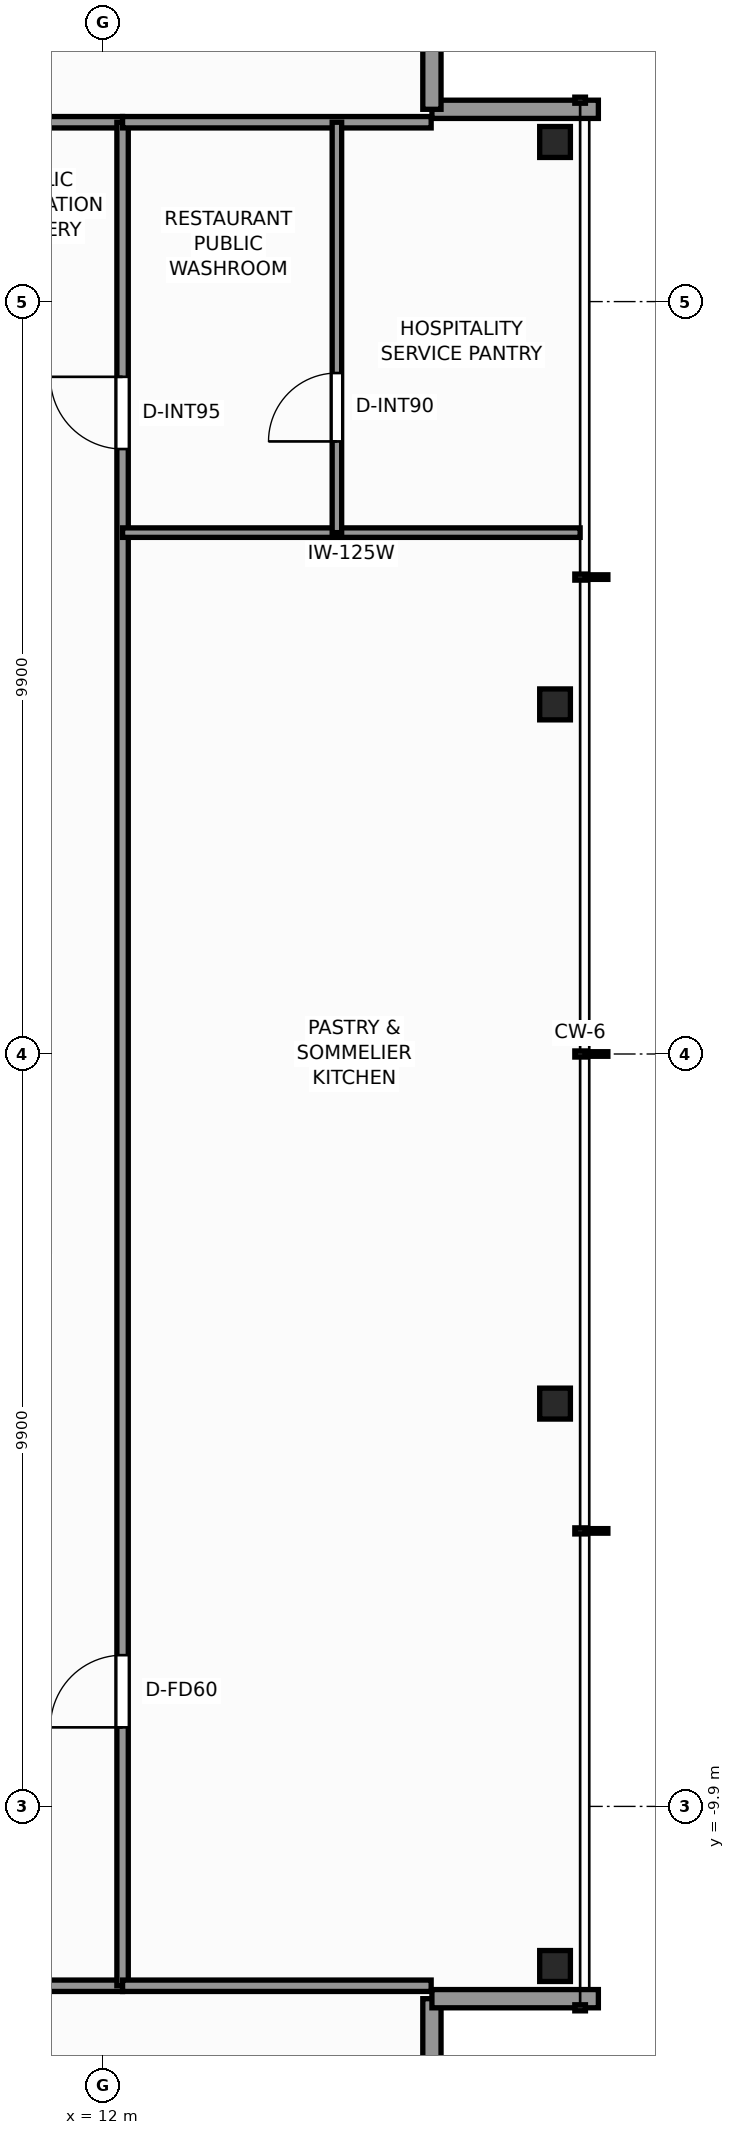
"""IFC4 building model, lengths in metres.
Left out: names, types, materials, properties, quantities, classifications, styles, units other than length and angle.
Written with IfcOpenShell. Run it as: python <this file> out.ifc"""

import sys

from ifc_helpers import new_model, si_unit, direction, frame, frame_2d, origin, origin_2d, place, context, subcontext, project, spatial, rectangle, i_section, extrude, element, fill, save


model = new_model("IFC4")
c1 = context("Model", 3, precision=1e-05, world=origin(), true_north=direction((0.0, 1.0)))
c2 = subcontext(c1, "Body", "Model", "MODEL_VIEW")
j1 = project(units=[si_unit("LENGTHUNIT", "METRE"), si_unit("PLANEANGLEUNIT", "RADIAN")], contexts=[c1])
p1 = place(None, origin())
s1 = spatial("IfcSite", under=j1, at=p1, CompositionType="ELEMENT")
p2 = place(p1, origin())
s2 = spatial("IfcBuilding", under=s1, at=p2, CompositionType="ELEMENT")
p3 = place(p2, frame((0.0, 0.0, 262.8)))
s3 = spatial("IfcBuildingStorey", under=s2, at=p3, CompositionType="ELEMENT", Elevation=262.8)
for number, where, z_axis, x_axis in (
    (1, (17.95, -12.0, 0.0), (0.0, 0.0, 1.0), (1.0, 0.0, 0.0)),
    (2, (17.95, -4.6, 0.0), (0.0, 0.0, 1.0), (1.0, 0.0, 0.0)),
    (3, (17.95, 4.6, 0.0), (0.0, 0.0, 1.0), (1.0, 0.0, 0.0)),
    (4, (17.95, 12.0, 0.0), (0.0, 0.0, 1.0), (1.0, 0.0, 0.0)),
):
    element("IfcColumn", number, at=place(p3, frame(where, z_axis=z_axis, x_axis=x_axis)), inside=s3, PredefinedType="COLUMN", context=c2, shape_type="SweptSolid", body=[
        extrude(i_section(OverallWidth=0.404, OverallDepth=0.407, WebThickness=0.027, FlangeThickness=0.044, FilletRadius=0.025, at=origin_2d()), origin(), (0.0, 0.0, 1.0), 4.6),
    ])
p4 = place(p3, frame((16.33, -12.43, 0.0), z_axis=(0.0, 0.0, 1.0), x_axis=(0.0, -1.0, 0.0)))
e5 = element("IfcWall", 5, at=p4, inside=s3, PredefinedType="STANDARD", context=c2, shape_type="SweptSolid", body=[
    extrude(rectangle(XDim=2.19, YDim=0.24, at=frame_2d((1.095, 0.0))), origin(), (0.0, 0.0, 1.0), 3.703),
])
for number, where, z_axis, x_axis in (
    (6, (18.52, -12.43, 0.0), (0.0, 0.0, 1.0), (-1.0, 0.0, 0.0)),
    (7, (16.33, 12.43, 0.0), (0.0, 0.0, 1.0), (1.0, 0.0, 0.0)),
):
    element("IfcWall", number, at=place(p3, frame(where, z_axis=z_axis, x_axis=x_axis)), inside=s3, PredefinedType="STANDARD", context=c2, shape_type="SweptSolid", body=[
        extrude(rectangle(XDim=2.19, YDim=0.24, at=frame_2d((1.095, 0.0))), origin(), (0.0, 0.0, 1.0), 3.703),
    ])
p5 = place(p3, frame((16.33, 14.62, 0.0), z_axis=(0.0, 0.0, 1.0), x_axis=(0.0, -1.0, 0.0)))
e8 = element("IfcWall", 8, at=p5, inside=s3, PredefinedType="STANDARD", context=c2, shape_type="SweptSolid", body=[
    extrude(rectangle(XDim=2.19, YDim=0.24, at=frame_2d((1.095, 0.0))), origin(), (0.0, 0.0, 1.0), 3.703),
])
p6 = place(p3, frame((-12.26, -12.26, 0.0), z_axis=(0.0, 0.0, 1.0), x_axis=(1.0, 0.0, 0.0)))
e9 = element("IfcWall", 9, at=p6, inside=s3, PredefinedType="PARTITIONING", context=c2, shape_type="SweptSolid", body=[
    extrude(rectangle(XDim=24.52, YDim=0.15, at=frame_2d((12.26, 0.0))), origin(), (0.0, 0.0, 1.0), 3.609),
])
p7 = place(p6, frame((3.6, 0.0, 0.0)))
e10 = element("IfcOpeningElement", 10, at=p7, cuts=e9, PredefinedType="OPENING", context=c2, shape_type="SweptSolid", body=[
    extrude(rectangle(XDim=1.6, YDim=2.3, at=frame_2d((0.8, 1.15))), frame((0.0, 0.085, 0.0), z_axis=(0.0, -1.0, 0.0), x_axis=(1.0, 0.0, 0.0)), (0.0, 0.0, 1.0), 0.17),
])
p8 = place(p6, frame((19.06, 0.0, 0.0)))
e11 = element("IfcOpeningElement", 11, at=p8, cuts=e9, PredefinedType="OPENING", context=c2, shape_type="SweptSolid", body=[
    extrude(rectangle(XDim=1.2, YDim=2.2, at=frame_2d((0.6, 1.1))), frame((0.0, 0.085, 0.0), z_axis=(0.0, -1.0, 0.0), x_axis=(1.0, 0.0, 0.0)), (0.0, 0.0, 1.0), 0.17),
])
p9 = place(p3, frame((-12.26, 12.26, 0.0), z_axis=(0.0, 0.0, 1.0), x_axis=(1.0, 0.0, 0.0)))
e12 = element("IfcWall", 12, at=p9, inside=s3, PredefinedType="PARTITIONING", context=c2, shape_type="SweptSolid", body=[
    extrude(rectangle(XDim=24.52, YDim=0.15, at=frame_2d((12.26, 0.0))), origin(), (0.0, 0.0, 1.0), 3.609),
])
p10 = place(p9, frame((1.8, 0.0, 0.0)))
e13 = element("IfcOpeningElement", 13, at=p10, cuts=e12, PredefinedType="OPENING", context=c2, shape_type="SweptSolid", body=[
    extrude(rectangle(XDim=0.95, YDim=2.06, at=frame_2d((0.475, 1.03))), frame((0.0, 0.085, 0.0), z_axis=(0.0, -1.0, 0.0), x_axis=(1.0, 0.0, 0.0)), (0.0, 0.0, 1.0), 0.17),
])
p11 = place(p9, frame((10.5, 0.0, 0.0)))
e14 = element("IfcOpeningElement", 14, at=p11, cuts=e12, PredefinedType="OPENING", context=c2, shape_type="SweptSolid", body=[
    extrude(rectangle(XDim=1.6, YDim=2.3, at=frame_2d((0.8, 1.15))), frame((0.0, 0.085, 0.0), z_axis=(0.0, -1.0, 0.0), x_axis=(1.0, 0.0, 0.0)), (0.0, 0.0, 1.0), 0.17),
])
p12 = place(p3, frame((12.26, -12.26, 0.0), z_axis=(0.0, 0.0, 1.0), x_axis=(0.0, 1.0, 0.0)))
e15 = element("IfcWall", 15, at=p12, inside=s3, PredefinedType="PARTITIONING", context=c2, shape_type="SweptSolid", body=[
    extrude(rectangle(XDim=24.52, YDim=0.15, at=frame_2d((12.26, 0.0))), origin(), (0.0, 0.0, 1.0), 3.609),
])
p13 = place(p12, frame((3.4, 0.0, 0.0)))
e16 = element("IfcOpeningElement", 16, at=p13, cuts=e15, PredefinedType="OPENING", context=c2, shape_type="SweptSolid", body=[
    extrude(rectangle(XDim=0.95, YDim=2.06, at=frame_2d((0.475, 1.03))), frame((0.0, 0.085, 0.0), z_axis=(0.0, -1.0, 0.0), x_axis=(1.0, 0.0, 0.0)), (0.0, 0.0, 1.0), 0.17),
])
p14 = place(p12, frame((20.22, 0.0, 0.0)))
e17 = element("IfcOpeningElement", 17, at=p14, cuts=e15, PredefinedType="OPENING", context=c2, shape_type="SweptSolid", body=[
    extrude(rectangle(XDim=0.95, YDim=2.06, at=frame_2d((0.475, 1.03))), frame((0.0, 0.085, 0.0), z_axis=(0.0, -1.0, 0.0), x_axis=(1.0, 0.0, 0.0)), (0.0, 0.0, 1.0), 0.17),
])
for number, where, z_axis, x_axis in (
    (18, (12.26, -12.26, 0.0), (0.0, 0.0, 1.0), (1.0, 0.0, 0.0)),
    (19, (12.26, 12.26, 0.0), (0.0, 0.0, 1.0), (1.0, 0.0, 0.0)),
):
    element("IfcWall", number, at=place(p3, frame(where, z_axis=z_axis, x_axis=x_axis)), inside=s3, PredefinedType="PARTITIONING", context=c2, shape_type="SweptSolid", body=[
        extrude(rectangle(XDim=4.06, YDim=0.15, at=frame_2d((2.03, 0.0))), origin(), (0.0, 0.0, 1.0), 4.32),
    ])
p15 = place(p3, frame((12.26, 6.86, 0.0), z_axis=(0.0, 0.0, 1.0), x_axis=(1.0, 0.0, 0.0)))
e20 = element("IfcWall", 20, at=p15, inside=s3, PredefinedType="PARTITIONING", context=c2, shape_type="SweptSolid", body=[
    extrude(rectangle(XDim=6.02, YDim=0.125, at=frame_2d((3.01, 0.0))), origin(), (0.0, 0.0, 1.0), 3.693),
])
p16 = place(p3, frame((15.08, 6.86, 0.0), z_axis=(0.0, 0.0, 1.0), x_axis=(0.0, 1.0, 0.0)))
e21 = element("IfcWall", 21, at=p16, inside=s3, PredefinedType="PARTITIONING", context=c2, shape_type="SweptSolid", body=[
    extrude(rectangle(XDim=5.4, YDim=0.125, at=frame_2d((2.7, 0.0))), origin(), (0.0, 0.0, 1.0), 3.609),
])
p17 = place(p16, frame((1.2, 0.0, 0.0)))
e22 = element("IfcOpeningElement", 22, at=p17, cuts=e21, PredefinedType="OPENING", context=c2, shape_type="SweptSolid", body=[
    extrude(rectangle(XDim=0.9, YDim=2.06, at=frame_2d((0.45, 1.03))), frame((0.0, 0.073, 0.0), z_axis=(0.0, -1.0, 0.0), x_axis=(1.0, 0.0, 0.0)), (0.0, 0.0, 1.0), 0.145),
])
p18 = place(p13, origin())
e23 = element("IfcDoor", 23, at=p18, inside=s3, OperationType="SINGLE_SWING_LEFT", PredefinedType="DOOR", context=c2, shape_type="SweptSolid", body=[
    extrude(rectangle(XDim=0.95, YDim=2.06, at=frame_2d((0.475, 1.03))), frame((0.0, 0.025, 0.0), z_axis=(0.0, -1.0, 0.0), x_axis=(1.0, 0.0, 0.0)), (0.0, 0.0, 1.0), 0.05),
])
fill(e16, e23)
p19 = place(p14, origin())
e24 = element("IfcDoor", 24, at=p19, inside=s3, OperationType="SINGLE_SWING_RIGHT", PredefinedType="DOOR", context=c2, shape_type="SweptSolid", body=[
    extrude(rectangle(XDim=0.95, YDim=2.06, at=frame_2d((0.475, 1.03))), frame((0.0, 0.025, 0.0), z_axis=(0.0, -1.0, 0.0), x_axis=(1.0, 0.0, 0.0)), (0.0, 0.0, 1.0), 0.05),
])
fill(e17, e24)
p20 = place(p17, origin())
e25 = element("IfcDoor", 25, at=p20, inside=s3, OperationType="SINGLE_SWING_LEFT", PredefinedType="DOOR", context=c2, shape_type="SweptSolid", body=[
    extrude(rectangle(XDim=0.9, YDim=2.06, at=frame_2d((0.45, 1.03))), frame((0.0, 0.025, 0.0), z_axis=(0.0, -1.0, 0.0), x_axis=(1.0, 0.0, 0.0)), (0.0, 0.0, 1.0), 0.05),
])
fill(e22, e25)
save(model, sys.argv[1])
